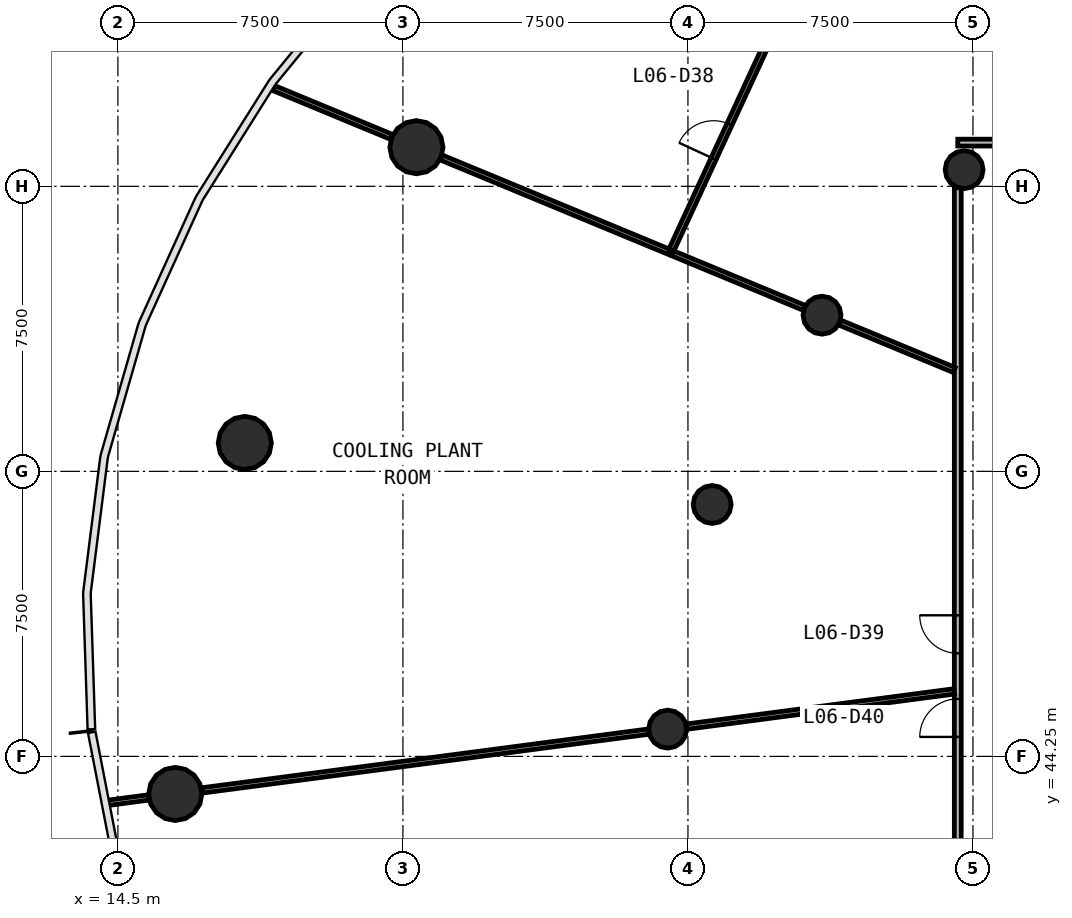
"""IFC4 building model, lengths in metres.
Left out: names, types, materials, properties, quantities, classifications, styles, units other than length and angle.
Written with IfcOpenShell. Run it as: python <this file> out.ifc"""

import sys

from ifc_helpers import new_model, si_unit, direction, frame, frame_2d, origin, origin_2d, place, context, subcontext, project, spatial, rectangle, circle, extrude, source, transform, mapped, element, fill, save


model = new_model("IFC4")
c1 = context("Model", 3, precision=1e-05, world=origin(), true_north=direction((0.0, 1.0)))
c2 = subcontext(c1, "Body", "Model", "MODEL_VIEW")
j1 = project(units=[si_unit("LENGTHUNIT", "METRE"), si_unit("PLANEANGLEUNIT", "RADIAN")], contexts=[c1])
p1 = place(None, origin())
s1 = spatial("IfcSite", under=j1, at=p1, CompositionType="ELEMENT")
p2 = place(p1, origin())
s2 = spatial("IfcBuilding", under=s1, at=p2, CompositionType="ELEMENT")
p3 = place(p2, frame((0.0, 0.0, 27.0)))
s3 = spatial("IfcBuildingStorey", under=s2, at=p3, CompositionType="ELEMENT", Elevation=27.0)
m1 = source(origin(), c2, "Body", "SweptSolid", [
    extrude(circle(Radius=0.7, at=origin_2d()), origin(), (0.0, 0.0, 1.0), 4.4),
])
for number, where, z_axis, x_axis in (
    (1, (22.355, 60.279, 0.0), (0.0, 0.0, 1.0), (1.0, 0.0, 0.0)),
    (2, (17.839, 52.497, 0.0), (0.0, 0.0, 1.0), (1.0, 0.0, 0.0)),
    (3, (16.01, 43.262, 0.0), (0.0, 0.0, 1.0), (1.0, 0.0, 0.0)),
):
    element("IfcColumn", number, at=place(p3, frame(where, z_axis=z_axis, x_axis=x_axis)), inside=s3, PredefinedType="COLUMN", context=c2, shape_type="MappedRepresentation", body=[
        mapped(m1, transform((0.0, 0.0, 0.0), scale=1.0)),
    ])
m2 = source(origin(), c2, "Body", "SweptSolid", [
    extrude(circle(Radius=0.5, at=origin_2d()), origin(), (0.0, 0.0, 1.0), 4.4),
])
for number, where, z_axis, x_axis in (
    (4, (36.768, 59.688, 0.0), (0.0, 0.0, 1.0), (1.0, 0.0, 0.0)),
    (5, (33.028, 55.859, 0.0), (0.0, 0.0, 1.0), (1.0, 0.0, 0.0)),
    (6, (30.137, 50.878, 0.0), (0.0, 0.0, 1.0), (1.0, 0.0, 0.0)),
    (7, (28.966, 44.968, 0.0), (0.0, 0.0, 1.0), (1.0, 0.0, 0.0)),
):
    element("IfcColumn", number, at=place(p3, frame(where, z_axis=z_axis, x_axis=x_axis)), inside=s3, PredefinedType="COLUMN", context=c2, shape_type="MappedRepresentation", body=[
        mapped(m2, transform((0.0, 0.0, 0.0), scale=1.0)),
    ])
p4 = place(p3, frame((36.6, 60.4, 0.0), z_axis=(0.0, 0.0, 1.0), x_axis=(1.0, 0.0, 0.0)))
e8 = element("IfcWall", 8, at=p4, inside=s3, PredefinedType="PARTITIONING", context=c2, shape_type="SweptSolid", body=[
    extrude(rectangle(XDim=30.8, YDim=0.18, at=frame_2d((15.4, 0.0))), origin(), (0.0, 0.0, 1.0), 3.05),
])
p5 = place(p4, frame((17.35, 0.0, 0.0)))
e9 = element("IfcOpeningElement", 9, at=p5, cuts=e8, PredefinedType="OPENING", context=c2, shape_type="SweptSolid", body=[
    extrude(rectangle(XDim=1.0, YDim=2.1, at=frame_2d((0.5, 1.05))), frame((0.0, 0.1, 0.0), z_axis=(0.0, -1.0, 0.0), x_axis=(1.0, 0.0, 0.0)), (0.0, 0.0, 1.0), 0.2),
])
p6 = place(p4, frame((14.95, 0.0, 0.0)))
e10 = element("IfcOpeningElement", 10, at=p6, cuts=e8, PredefinedType="OPENING", context=c2, shape_type="SweptSolid", body=[
    extrude(rectangle(XDim=1.0, YDim=2.1, at=frame_2d((0.5, 1.05))), frame((0.0, 0.1, 0.0), z_axis=(0.0, -1.0, 0.0), x_axis=(1.0, 0.0, 0.0)), (0.0, 0.0, 1.0), 0.2),
])
p7 = place(p4, frame((12.55, 0.0, 0.0)))
e11 = element("IfcOpeningElement", 11, at=p7, cuts=e8, PredefinedType="OPENING", context=c2, shape_type="SweptSolid", body=[
    extrude(rectangle(XDim=1.0, YDim=2.1, at=frame_2d((0.5, 1.05))), frame((0.0, 0.1, 0.0), z_axis=(0.0, -1.0, 0.0), x_axis=(1.0, 0.0, 0.0)), (0.0, 0.0, 1.0), 0.2),
])
p8 = place(p3, frame((36.6, 35.63, 0.0), z_axis=(0.0, 0.0, 1.0), x_axis=(0.0, 1.0, 0.0)))
e12 = element("IfcWall", 12, at=p8, inside=s3, PredefinedType="PARTITIONING", context=c2, shape_type="SweptSolid", body=[
    extrude(rectangle(XDim=23.583, YDim=0.18, at=frame_2d((11.791, 0.0))), origin(), (0.0, 0.0, 1.0), 3.05),
])
p9 = place(p8, frame((11.333, 0.0, 0.0)))
e13 = element("IfcOpeningElement", 13, at=p9, cuts=e12, PredefinedType="OPENING", context=c2, shape_type="SweptSolid", body=[
    extrude(rectangle(XDim=1.0, YDim=2.1, at=frame_2d((0.5, 1.05))), frame((0.0, 0.1, 0.0), z_axis=(0.0, -1.0, 0.0), x_axis=(1.0, 0.0, 0.0)), (0.0, 0.0, 1.0), 0.2),
])
p10 = place(p8, frame((9.133, 0.0, 0.0)))
e14 = element("IfcOpeningElement", 14, at=p10, cuts=e12, PredefinedType="OPENING", context=c2, shape_type="SweptSolid", body=[
    extrude(rectangle(XDim=1.0, YDim=2.1, at=frame_2d((0.5, 1.05))), frame((0.0, 0.1, 0.0), z_axis=(0.0, -1.0, 0.0), x_axis=(1.0, 0.0, 0.0)), (0.0, 0.0, 1.0), 0.2),
])
p11 = place(p3, frame((28.466, 44.902, 0.0), z_axis=(0.0, 0.0, 1.0), x_axis=(-0.991446586451, -0.130513088287, 0.0)))
e15 = element("IfcWall", 15, at=p11, inside=s3, PredefinedType="PARTITIONING", context=c2, shape_type="SweptSolid", body=[
    extrude(rectangle(XDim=11.86, YDim=0.14, at=frame_2d((5.93, 0.0))), origin(), (0.0, 0.0, 1.0), 3.05),
])
p12 = place(p3, frame((36.51, 45.961, 0.0), z_axis=(0.0, 0.0, 1.0), x_axis=(-0.99144622305, -0.130515848849, 0.0)))
e16 = element("IfcWall", 16, at=p12, inside=s3, PredefinedType="PARTITIONING", context=c2, shape_type="SweptSolid", body=[
    extrude(rectangle(XDim=7.104, YDim=0.14, at=frame_2d((3.552, 0.0))), origin(), (0.0, 0.0, 1.0), 3.05),
])
p13 = place(p3, frame((29.037, 57.512, 0.0), z_axis=(0.0, 0.0, 1.0), x_axis=(0.419404841199, 0.907799305562, 0.0)))
e17 = element("IfcWall", 17, at=p13, inside=s3, PredefinedType="PARTITIONING", context=c2, shape_type="SweptSolid", body=[
    extrude(rectangle(XDim=6.564, YDim=0.14, at=frame_2d((3.282, 0.0))), origin(), (0.0, 0.0, 1.0), 3.05),
])
p14 = place(p13, frame((2.715, 0.0, 0.0)))
e18 = element("IfcOpeningElement", 18, at=p14, cuts=e17, PredefinedType="OPENING", context=c2, shape_type="SweptSolid", body=[
    extrude(rectangle(XDim=1.0, YDim=2.1, at=frame_2d((0.5, 1.05))), frame((0.0, 0.08, 0.0), z_axis=(0.0, -1.0, 0.0), x_axis=(1.0, 0.0, 0.0)), (0.0, 0.0, 1.0), 0.16),
])
p15 = place(p3, frame((29.009, 57.523, 0.0), z_axis=(0.0, 0.0, 1.0), x_axis=(-0.923872097861, 0.382701380705, 0.0)))
e19 = element("IfcWall", 19, at=p15, inside=s3, PredefinedType="PARTITIONING", context=c2, shape_type="SweptSolid", body=[
    extrude(rectangle(XDim=6.497, YDim=0.14, at=frame_2d((3.249, 0.0))), origin(), (0.0, 0.0, 1.0), 3.05),
])
p16 = place(p3, frame((32.561, 56.052, 0.0), z_axis=(0.0, 0.0, 1.0), x_axis=(-0.923888895389, 0.382660827596, 0.0)))
e20 = element("IfcWall", 20, at=p16, inside=s3, PredefinedType="PARTITIONING", context=c2, shape_type="SweptSolid", body=[
    extrude(rectangle(XDim=3.744, YDim=0.14, at=frame_2d((1.872, 0.0))), origin(), (0.0, 0.0, 1.0), 3.05),
])
p17 = place(p3, frame((21.704, 60.549, 0.0), z_axis=(0.0, 0.0, 1.0), x_axis=(-0.923894038604, 0.382648409681, 0.0)))
e21 = element("IfcWall", 21, at=p17, inside=s3, PredefinedType="PARTITIONING", context=c2, shape_type="SweptSolid", body=[
    extrude(rectangle(XDim=3.368, YDim=0.14, at=frame_2d((1.684, 0.0))), origin(), (0.0, 0.0, 1.0), 3.05),
])
p18 = place(p3, frame((36.51, 54.416, 0.0), z_axis=(0.0, 0.0, 1.0), x_axis=(-0.923911109142, 0.382607190737, 0.0)))
e22 = element("IfcWall", 22, at=p18, inside=s3, PredefinedType="PARTITIONING", context=c2, shape_type="SweptSolid", body=[
    extrude(rectangle(XDim=3.264, YDim=0.14, at=frame_2d((1.632, 0.0))), origin(), (0.0, 0.0, 1.0), 3.05),
])
p19 = place(p3, frame((15.311, 43.17, 0.0), z_axis=(0.0, 0.0, 1.0), x_axis=(-0.991442282273, -0.13054578094, 0.0)))
e23 = element("IfcWall", 23, at=p19, inside=s3, PredefinedType="PARTITIONING", context=c2, shape_type="SweptSolid", body=[
    extrude(rectangle(XDim=1.107, YDim=0.14, at=frame_2d((0.554, 0.0))), origin(), (0.0, 0.0, 1.0), 3.05),
])
m3 = source(origin(), c2, "Body", "SweptSolid", [
    extrude(rectangle(XDim=1.0, YDim=2.1, at=frame_2d((0.5, 1.05))), frame((0.0, 0.025, 0.0), z_axis=(0.0, -1.0, 0.0), x_axis=(1.0, 0.0, 0.0)), (0.0, 0.0, 1.0), 0.05),
])
p20 = place(p14, origin())
e24 = element("IfcDoor", 24, at=p20, inside=s3, OperationType="SINGLE_SWING_LEFT", PredefinedType="DOOR", context=c2, shape_type="MappedRepresentation", body=[
    mapped(m3, transform((0.0, 0.0, 0.0), scale=1.0)),
])
fill(e18, e24)
p21 = place(p9, origin())
e25 = element("IfcDoor", 25, at=p21, inside=s3, OperationType="SINGLE_SWING_RIGHT", PredefinedType="DOOR", context=c2, shape_type="MappedRepresentation", body=[
    mapped(m3, transform((0.0, 0.0, 0.0), scale=1.0)),
])
fill(e13, e25)
p22 = place(p10, origin())
e26 = element("IfcDoor", 26, at=p22, inside=s3, OperationType="SINGLE_SWING_LEFT", PredefinedType="DOOR", context=c2, shape_type="MappedRepresentation", body=[
    mapped(m3, transform((0.0, 0.0, 0.0), scale=1.0)),
])
fill(e14, e26)
save(model, sys.argv[1])
